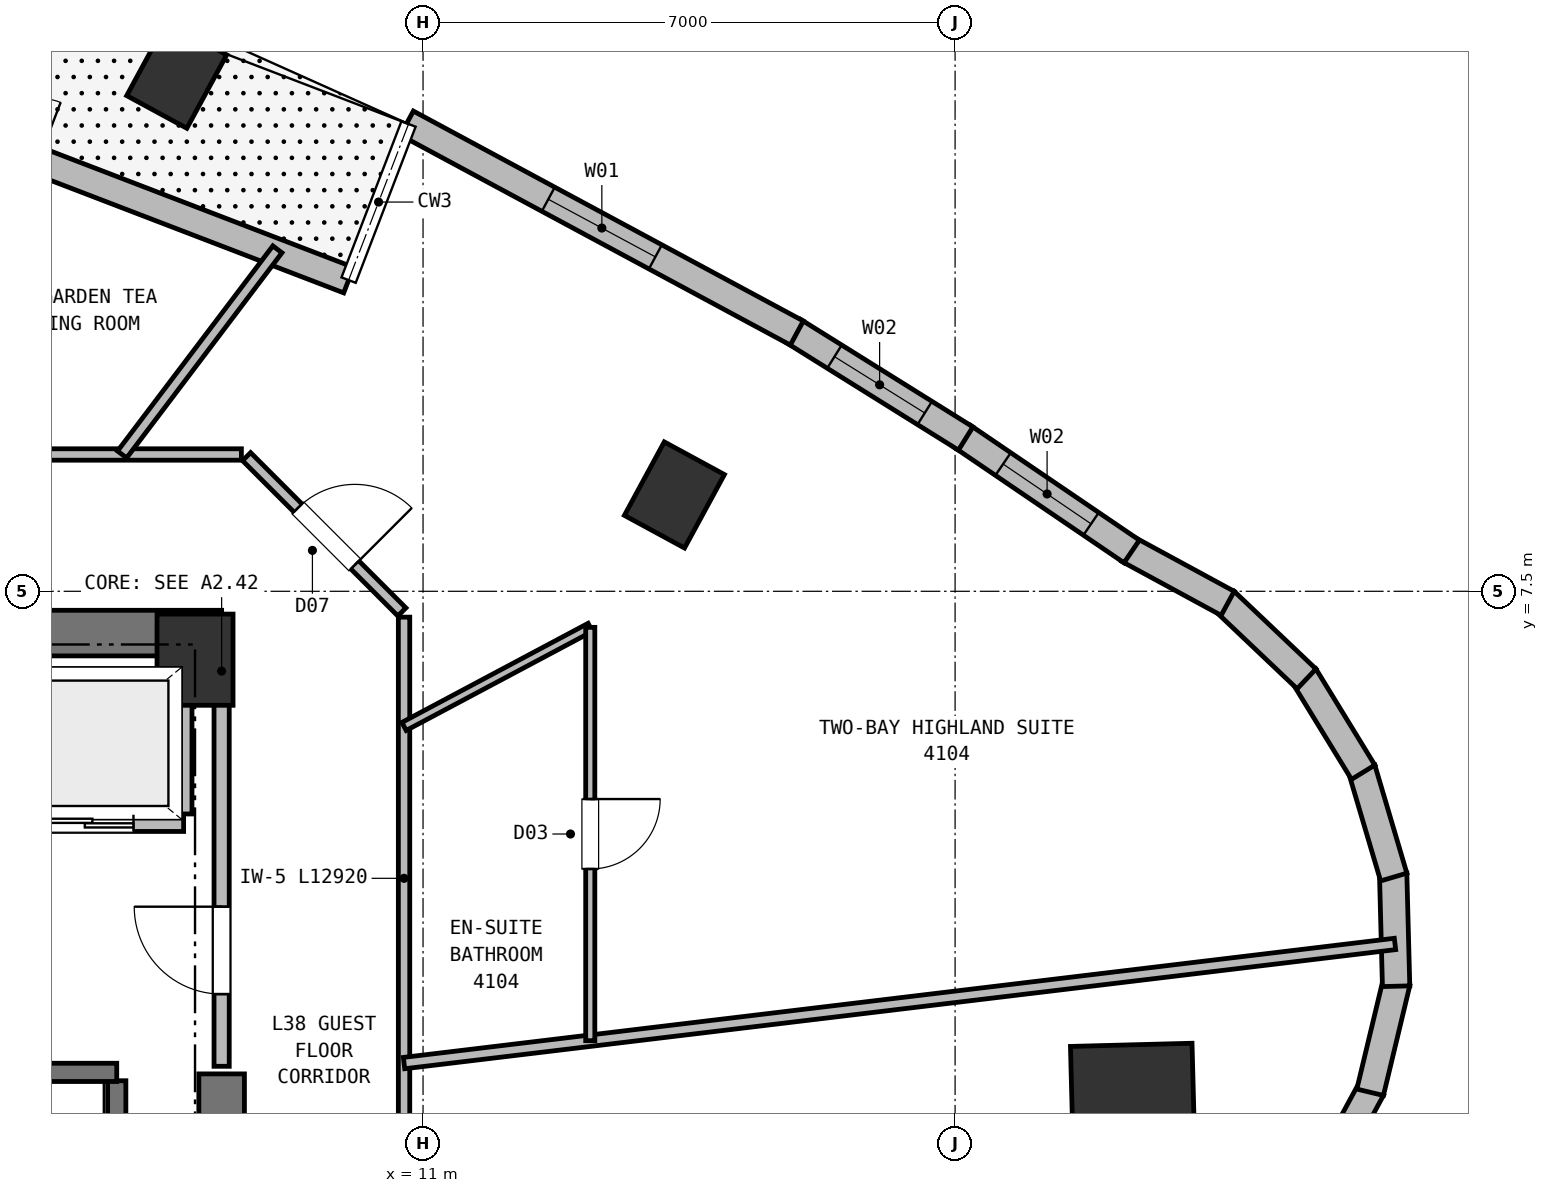
"""IFC4 building model, lengths in metres.
Left out: names, types, materials, properties, quantities, classifications, styles, units other than length and angle.
Written with IfcOpenShell. Run it as: python <this file> out.ifc"""

import sys

from ifc_helpers import new_model, si_unit, direction, frame, frame_2d, origin, origin_2d, place, context, subcontext, project, spatial, rectangle, extrude, element, fill, save


model = new_model("IFC4")
c1 = context("Model", 3, precision=1e-05, world=origin(), true_north=direction((0.0, 1.0)))
c2 = subcontext(c1, "Body", "Model", "MODEL_VIEW")
j1 = project(units=[si_unit("LENGTHUNIT", "METRE"), si_unit("PLANEANGLEUNIT", "RADIAN")], contexts=[c1])
p1 = place(None, origin())
s1 = spatial("IfcSite", under=j1, at=p1, CompositionType="ELEMENT")
p2 = place(p1, origin())
s2 = spatial("IfcBuilding", under=s1, at=p2, CompositionType="ELEMENT")
p3 = place(p2, frame((0.0, 0.0, 153.5)))
s3 = spatial("IfcBuildingStorey", under=s2, at=p3, CompositionType="ELEMENT", Elevation=153.5)
p4 = place(p3, frame((8.0, 6.6, 0.0), z_axis=(0.0, 0.0, 1.0), x_axis=(1.0, 0.0, 0.0)))
e1 = element("IfcColumn", 1, at=p4, inside=s3, PredefinedType="COLUMN", context=c2, shape_type="SweptSolid", body=[
    extrude(rectangle(XDim=1.0, YDim=1.2, at=origin_2d()), origin(), (0.0, 0.0, 1.0), 3.75),
])
p5 = place(p3, frame((-8.35, 6.95, 0.0), z_axis=(0.0, 0.0, 1.0), x_axis=(1.0, 0.0, 0.0)))
e2 = element("IfcWall", 2, at=p5, inside=s3, PredefinedType="SHEAR", context=c2, shape_type="SweptSolid", body=[
    extrude(rectangle(XDim=16.7, YDim=0.6, at=frame_2d((8.35, 0.0))), origin(), (0.0, 0.0, 1.0), 3.5),
])
p6 = place(p3, frame((8.35, -6.95, 0.0), z_axis=(0.0, 0.0, 1.0), x_axis=(0.0, 1.0, 0.0)))
e3 = element("IfcWall", 3, at=p6, inside=s3, PredefinedType="SHEAR", context=c2, shape_type="SweptSolid", body=[
    extrude(rectangle(XDim=8.1, YDim=0.6, at=frame_2d((4.05, 0.0))), origin(), (0.0, 0.0, 1.0), 3.5),
])
p7 = place(p3, frame((20.344, 0.533, 0.0), z_axis=(0.0, 0.0, 1.0), x_axis=(0.999657324976, 0.026176948308, 0.0)))
e4 = element("IfcColumn", 4, at=p7, inside=s3, PredefinedType="COLUMN", context=c2, shape_type="SweptSolid", body=[
    extrude(rectangle(XDim=1.6, YDim=2.0, at=origin_2d()), origin(), (0.0, 0.0, 1.0), 3.75),
])
for number, where, z_axis, x_axis in (
    (5, (14.307, 8.767, 0.0), (0.0, 0.0, 1.0), (-0.879, 0.477, 0.0)),
    (6, (7.759, 14.29, 0.0), (0.0, 0.0, 1.0), (-0.879, 0.477, 0.0)),
):
    element("IfcColumn", number, at=place(p3, frame(where, z_axis=z_axis, x_axis=x_axis)), inside=s3, PredefinedType="COLUMN", context=c2, shape_type="SweptSolid", body=[
        extrude(rectangle(XDim=0.9, YDim=1.1, at=origin_2d()), origin(), (0.0, 0.0, 1.0), 3.75),
    ])
p8 = place(p3, frame((0.312, 15.322, 0.0), z_axis=(0.0, 0.0, 1.0), x_axis=(0.933571699069, -0.358390684445, 0.0)))
e7 = element("IfcWall", 7, at=p8, inside=s3, PredefinedType="SOLIDWALL", context=c2, shape_type="SweptSolid", body=[
    extrude(rectangle(XDim=10.4, YDim=0.36, at=frame_2d((5.2, 0.0))), origin(), (0.0, 0.0, 1.0), 3.5),
])
p9 = place(p8, frame((4.375, 0.0, 0.0)))
e8 = element("IfcOpeningElement", 8, at=p9, cuts=e7, PredefinedType="OPENING", context=c2, shape_type="SweptSolid", body=[
    extrude(rectangle(XDim=1.65, YDim=2.25, at=frame_2d((0.825, 1.125))), frame((0.0, 0.19, 0.0), z_axis=(0.0, -1.0, 0.0), x_axis=(1.0, 0.0, 0.0)), (0.0, 0.0, 1.0), 0.38),
])
p10 = place(p3, frame((23.479, 0.955, 0.0), z_axis=(0.0, 0.0, 1.0), x_axis=(-0.477124494484, -0.878835716595, 0.0)))
e9 = element("IfcWall", 9, at=p10, inside=s3, PredefinedType="SOLIDWALL", context=c2, shape_type="SweptSolid", body=[
    extrude(rectangle(XDim=1.486, YDim=0.36, at=frame_2d((0.743, 0.0))), origin(), (0.0, 0.0, 1.0), 3.5),
])
for number, where, z_axis, x_axis in (
    (10, (23.808, 2.353, 0.0), (0.0, 0.0, 1.0), (-0.234, -0.972, 0.0)),
    (11, (23.763, 3.789, 0.0), (0.0, 0.0, 1.0), (0.026, -1.0, 0.0)),
):
    element("IfcWall", number, at=place(p3, frame(where, z_axis=z_axis, x_axis=x_axis)), inside=s3, PredefinedType="SOLIDWALL", context=c2, shape_type="SweptSolid", body=[
        extrude(rectangle(XDim=1.486, YDim=0.36, at=frame_2d((0.743, 0.0))), origin(), (0.0, 0.0, 1.0), 3.5),
    ])
for number, where, z_axis, x_axis in (
    (12, (23.349, 5.165, 0.0), (0.0, 0.0, 1.0), (0.284, -0.959, 0.0)),
    (13, (22.593, 6.386, 0.0), (0.0, 0.0, 1.0), (0.523, -0.853, 0.0)),
):
    element("IfcWall", number, at=place(p3, frame(where, z_axis=z_axis, x_axis=x_axis)), inside=s3, PredefinedType="SOLIDWALL", context=c2, shape_type="SweptSolid", body=[
        extrude(rectangle(XDim=1.486, YDim=0.36, at=frame_2d((0.743, 0.0))), origin(), (0.0, 0.0, 1.0), 3.5),
    ])
p11 = place(p3, frame((21.546, 7.37, 0.0), z_axis=(0.0, 0.0, 1.0), x_axis=(0.725348001868, -0.688382361908, 0.0)))
e14 = element("IfcWall", 14, at=p11, inside=s3, PredefinedType="SOLIDWALL", context=c2, shape_type="SweptSolid", body=[
    extrude(rectangle(XDim=1.486, YDim=0.36, at=frame_2d((0.743, 0.0))), origin(), (0.0, 0.0, 1.0), 3.5),
])
p12 = place(p3, frame((20.281, 8.05, 0.0), z_axis=(0.0, 0.0, 1.0), x_axis=(0.87890460574, -0.476997582812, 0.0)))
e15 = element("IfcWall", 15, at=p12, inside=s3, PredefinedType="SOLIDWALL", context=c2, shape_type="SweptSolid", body=[
    extrude(rectangle(XDim=1.486, YDim=0.36, at=frame_2d((0.743, 0.0))), origin(), (0.0, 0.0, 1.0), 3.5),
])
p13 = place(p3, frame((18.097, 9.537, 0.0), z_axis=(0.0, 0.0, 1.0), x_axis=(0.827020963394, -0.562171082596, 0.0)))
e16 = element("IfcWall", 16, at=p13, inside=s3, PredefinedType="SOLIDWALL", context=c2, shape_type="SweptSolid", body=[
    extrude(rectangle(XDim=2.692, YDim=0.36, at=frame_2d((1.346, 0.0))), origin(), (0.0, 0.0, 1.0), 3.5),
])
p14 = place(p13, frame((0.646, 0.0, 0.72)))
e17 = element("IfcOpeningElement", 17, at=p14, cuts=e16, PredefinedType="OPENING", context=c2, shape_type="SweptSolid", body=[
    extrude(rectangle(XDim=1.4, YDim=1.84, at=frame_2d((0.7, 0.92))), frame((0.0, 0.19, 0.0), z_axis=(0.0, -1.0, 0.0), x_axis=(1.0, 0.0, 0.0)), (0.0, 0.0, 1.0), 0.38),
])
p15 = place(p3, frame((15.875, 10.924, 0.0), z_axis=(0.0, 0.0, 1.0), x_axis=(0.848332062802, -0.529464551431, 0.0)))
e18 = element("IfcWall", 18, at=p15, inside=s3, PredefinedType="SOLIDWALL", context=c2, shape_type="SweptSolid", body=[
    extrude(rectangle(XDim=2.67, YDim=0.36, at=frame_2d((1.335, 0.0))), origin(), (0.0, 0.0, 1.0), 3.5),
])
p16 = place(p15, frame((0.635, 0.0, 0.72)))
e19 = element("IfcOpeningElement", 19, at=p16, cuts=e18, PredefinedType="OPENING", context=c2, shape_type="SweptSolid", body=[
    extrude(rectangle(XDim=1.4, YDim=1.84, at=frame_2d((0.7, 0.92))), frame((0.0, 0.19, 0.0), z_axis=(0.0, -1.0, 0.0), x_axis=(1.0, 0.0, 0.0)), (0.0, 0.0, 1.0), 0.38),
])
p17 = place(p3, frame((10.787, 13.66, 0.0), z_axis=(0.0, 0.0, 1.0), x_axis=(0.880519529696, -0.474009871019, 0.0)))
e20 = element("IfcWall", 20, at=p17, inside=s3, PredefinedType="SOLIDWALL", context=c2, shape_type="SweptSolid", body=[
    extrude(rectangle(XDim=5.827, YDim=0.36, at=frame_2d((2.914, 0.0))), origin(), (0.0, 0.0, 1.0), 3.5),
])
p18 = place(p17, frame((2.113, 0.0, 0.72)))
e21 = element("IfcOpeningElement", 21, at=p18, cuts=e20, PredefinedType="OPENING", context=c2, shape_type="SweptSolid", body=[
    extrude(rectangle(XDim=1.6, YDim=1.88, at=frame_2d((0.8, 0.94))), frame((0.0, 0.19, 0.0), z_axis=(0.0, -1.0, 0.0), x_axis=(1.0, 0.0, 0.0)), (0.0, 0.0, 1.0), 0.38),
])
p19 = place(p3, frame((6.97, -6.16, 0.0), z_axis=(0.0, 0.0, 1.0), x_axis=(0.0, 1.0, 0.0)))
e22 = element("IfcWall", 22, at=p19, inside=s3, PredefinedType="SHEAR", context=c2, shape_type="SweptSolid", body=[
    extrude(rectangle(XDim=7.22, YDim=0.24, at=frame_2d((3.61, 0.0))), origin(), (0.0, 0.0, 1.0), 3.5),
])
p20 = place(p3, frame((4.01, 1.17, 0.0), z_axis=(0.0, 0.0, 1.0), x_axis=(1.0, 0.0, 0.0)))
e23 = element("IfcWall", 23, at=p20, inside=s3, PredefinedType="SHEAR", context=c2, shape_type="SweptSolid", body=[
    extrude(rectangle(XDim=2.96, YDim=0.24, at=frame_2d((1.48, 0.0))), origin(), (0.0, 0.0, 1.0), 3.5),
])
p21 = place(p20, frame((0.9, 0.0, 0.0)))
e24 = element("IfcOpeningElement", 24, at=p21, cuts=e23, PredefinedType="OPENING", context=c2, shape_type="SweptSolid", body=[
    extrude(rectangle(XDim=1.15, YDim=2.15, at=frame_2d((0.575, 1.075))), frame((0.0, 0.13, 0.0), z_axis=(0.0, -1.0, 0.0), x_axis=(1.0, 0.0, 0.0)), (0.0, 0.0, 1.0), 0.26),
])
p22 = place(p3, frame((5.35, 4.45, 0.0), z_axis=(0.0, 0.0, 1.0), x_axis=(1.0, 0.0, 0.0)))
e25 = element("IfcWall", 25, at=p22, inside=s3, PredefinedType="PARTITIONING", context=c2, shape_type="SweptSolid", body=[
    extrude(rectangle(XDim=2.5, YDim=0.22, at=frame_2d((1.25, 0.0))), origin(), (0.0, 0.0, 1.0), 3.5),
])
p23 = place(p22, frame((0.66, 0.0, 0.0)))
e26 = element("IfcOpeningElement", 26, at=p23, cuts=e25, PredefinedType="OPENING", context=c2, shape_type="SweptSolid", body=[
    extrude(rectangle(XDim=1.18, YDim=2.15, at=frame_2d((0.59, 1.075))), frame((0.0, 0.12, 0.0), z_axis=(0.0, -1.0, 0.0), x_axis=(1.0, 0.0, 0.0)), (0.0, 0.0, 1.0), 0.24),
])
p24 = place(p3, frame((7.85, 4.57, 0.0), z_axis=(0.0, 0.0, 1.0), x_axis=(0.0, 1.0, 0.0)))
e27 = element("IfcWall", 27, at=p24, inside=s3, PredefinedType="PARTITIONING", context=c2, shape_type="SweptSolid", body=[
    extrude(rectangle(XDim=2.08, YDim=0.22, at=frame_2d((1.04, 0.0))), origin(), (0.0, 0.0, 1.0), 3.12),
])
p25 = place(p3, frame((8.35, 1.25, 0.0), z_axis=(0.0, 0.0, 1.0), x_axis=(0.0, 1.0, 0.0)))
e28 = element("IfcWall", 28, at=p25, inside=s3, PredefinedType="PARTITIONING", context=c2, shape_type="SweptSolid", body=[
    extrude(rectangle(XDim=5.3, YDim=0.2, at=frame_2d((2.65, 0.0))), origin(), (0.0, 0.0, 1.0), 3.5),
])
p26 = place(p25, frame((0.95, 0.0, 0.0)))
e29 = element("IfcOpeningElement", 29, at=p26, cuts=e28, PredefinedType="OPENING", context=c2, shape_type="SweptSolid", body=[
    extrude(rectangle(XDim=1.15, YDim=2.15, at=frame_2d((0.575, 1.075))), frame((0.0, 0.11, 0.0), z_axis=(0.0, -1.0, 0.0), x_axis=(1.0, 0.0, 0.0)), (0.0, 0.0, 1.0), 0.22),
])
p27 = place(p3, frame((10.75, 7.16, 0.0), z_axis=(0.0, 0.0, 1.0), x_axis=(0.0, -1.0, 0.0)))
e30 = element("IfcWall", 30, at=p27, inside=s3, PredefinedType="PARTITIONING", context=c2, shape_type="SweptSolid", body=[
    extrude(rectangle(XDim=12.92, YDim=0.15, at=frame_2d((6.46, 0.0))), origin(), (0.0, 0.0, 1.0), 3.5),
])
p28 = place(p27, frame((6.973, 0.0, 0.0)))
e31 = element("IfcOpeningElement", 31, at=p28, cuts=e30, PredefinedType="OPENING", context=c2, shape_type="SweptSolid", body=[
    extrude(rectangle(XDim=1.06, YDim=2.15, at=frame_2d((0.53, 1.075))), frame((0.0, 0.085, 0.0), z_axis=(0.0, -1.0, 0.0), x_axis=(1.0, 0.0, 0.0)), (0.0, 0.0, 1.0), 0.17),
])
p29 = place(p3, frame((8.678, 9.272, 0.0), z_axis=(0.0, 0.0, 1.0), x_axis=(0.707106781187, -0.707106781187, 0.0)))
e32 = element("IfcWall", 32, at=p29, inside=s3, PredefinedType="PARTITIONING", context=c2, shape_type="SweptSolid", body=[
    extrude(rectangle(XDim=2.89, YDim=0.15, at=frame_2d((1.445, 0.0))), origin(), (0.0, 0.0, 1.0), 3.5),
])
p30 = place(p29, frame((0.955, 0.0, 0.0)))
e33 = element("IfcOpeningElement", 33, at=p30, cuts=e32, PredefinedType="OPENING", context=c2, shape_type="SweptSolid", body=[
    extrude(rectangle(XDim=1.06, YDim=2.15, at=frame_2d((0.53, 1.075))), frame((0.0, 0.085, 0.0), z_axis=(0.0, -1.0, 0.0), x_axis=(1.0, 0.0, 0.0)), (0.0, 0.0, 1.0), 0.17),
])
p31 = place(p3, frame((-8.61, 9.3, 0.0), z_axis=(0.0, 0.0, 1.0), x_axis=(1.0, 0.0, 0.0)))
e34 = element("IfcWall", 34, at=p31, inside=s3, PredefinedType="PARTITIONING", context=c2, shape_type="SweptSolid", body=[
    extrude(rectangle(XDim=17.22, YDim=0.15, at=frame_2d((8.61, 0.0))), origin(), (0.0, 0.0, 1.0), 3.5),
])
p32 = place(p31, frame((12.527, 0.0, 0.0)))
e35 = element("IfcOpeningElement", 35, at=p32, cuts=e34, PredefinedType="OPENING", context=c2, shape_type="SweptSolid", body=[
    extrude(rectangle(XDim=1.0, YDim=2.15, at=frame_2d((0.5, 1.075))), frame((0.0, 0.085, 0.0), z_axis=(0.0, -1.0, 0.0), x_axis=(1.0, 0.0, 0.0)), (0.0, 0.0, 1.0), 0.17),
])
p33 = place(p31, frame((6.231, 0.0, 0.0)))
e36 = element("IfcOpeningElement", 36, at=p33, cuts=e34, PredefinedType="OPENING", context=c2, shape_type="SweptSolid", body=[
    extrude(rectangle(XDim=1.06, YDim=2.15, at=frame_2d((0.53, 1.075))), frame((0.0, 0.085, 0.0), z_axis=(0.0, -1.0, 0.0), x_axis=(1.0, 0.0, 0.0)), (0.0, 0.0, 1.0), 0.17),
])
p34 = place(p31, frame((0.14, 0.0, 0.0)))
e37 = element("IfcOpeningElement", 37, at=p34, cuts=e34, PredefinedType="OPENING", context=c2, shape_type="SweptSolid", body=[
    extrude(rectangle(XDim=1.06, YDim=2.15, at=frame_2d((0.53, 1.075))), frame((0.0, 0.085, 0.0), z_axis=(0.0, -1.0, 0.0), x_axis=(1.0, 0.0, 0.0)), (0.0, 0.0, 1.0), 0.17),
])
p35 = place(p3, frame((10.75, 1.292, 0.0), z_axis=(0.0, 0.0, 1.0), x_axis=(0.992851215359, 0.119358552939, 0.0)))
e38 = element("IfcWall", 38, at=p35, inside=s3, PredefinedType="PARTITIONING", context=c2, shape_type="SweptSolid", body=[
    extrude(rectangle(XDim=13.132, YDim=0.15, at=frame_2d((6.566, 0.0))), origin(), (0.0, 0.0, 1.0), 3.5),
])
p36 = place(p3, frame((13.2, 7.026, 0.0), z_axis=(0.0, 0.0, 1.0), x_axis=(-0.88275440909, -0.469834708416, 0.0)))
e39 = element("IfcWall", 39, at=p36, inside=s3, PredefinedType="PARTITIONING", context=c2, shape_type="SweptSolid", body=[
    extrude(rectangle(XDim=2.775, YDim=0.12, at=frame_2d((1.388, 0.0))), origin(), (0.0, 0.0, 1.0), 3.5),
])
p37 = place(p3, frame((13.2, 7.026, 0.0), z_axis=(0.0, 0.0, 1.0), x_axis=(0.0, -1.0, 0.0)))
e40 = element("IfcWall", 40, at=p37, inside=s3, PredefinedType="PARTITIONING", context=c2, shape_type="SweptSolid", body=[
    extrude(rectangle(XDim=5.439, YDim=0.12, at=frame_2d((2.719, 0.0))), origin(), (0.0, 0.0, 1.0), 3.5),
])
p38 = place(p37, frame((2.259, 0.0, 0.0)))
e41 = element("IfcOpeningElement", 41, at=p38, cuts=e40, PredefinedType="OPENING", context=c2, shape_type="SweptSolid", body=[
    extrude(rectangle(XDim=0.92, YDim=2.1, at=frame_2d((0.46, 1.05))), frame((0.0, 0.07, 0.0), z_axis=(0.0, -1.0, 0.0), x_axis=(1.0, 0.0, 0.0)), (0.0, 0.0, 1.0), 0.14),
])
p39 = place(p3, frame((7.04, 9.3, 0.0), z_axis=(0.0, 0.0, 1.0), x_axis=(0.603559151409, 0.797318224268, 0.0)))
e42 = element("IfcWall", 42, at=p39, inside=s3, PredefinedType="PARTITIONING", context=c2, shape_type="SweptSolid", body=[
    extrude(rectangle(XDim=3.386, YDim=0.15, at=frame_2d((1.693, 0.0))), origin(), (0.0, 0.0, 1.0), 3.5),
])
p40 = place(p14, origin())
e43 = element("IfcWindow", 43, at=p40, inside=s3, PartitioningType="SINGLE_PANEL", PredefinedType="WINDOW", context=c2, shape_type="SweptSolid", body=[
    extrude(rectangle(XDim=1.4, YDim=1.84, at=frame_2d((0.7, 0.92))), frame((0.0, 0.03, 0.0), z_axis=(0.0, -1.0, 0.0), x_axis=(1.0, 0.0, 0.0)), (0.0, 0.0, 1.0), 0.06),
])
fill(e17, e43)
p41 = place(p16, origin())
e44 = element("IfcWindow", 44, at=p41, inside=s3, PartitioningType="SINGLE_PANEL", PredefinedType="WINDOW", context=c2, shape_type="SweptSolid", body=[
    extrude(rectangle(XDim=1.4, YDim=1.84, at=frame_2d((0.7, 0.92))), frame((0.0, 0.03, 0.0), z_axis=(0.0, -1.0, 0.0), x_axis=(1.0, 0.0, 0.0)), (0.0, 0.0, 1.0), 0.06),
])
fill(e19, e44)
p42 = place(p18, origin())
e45 = element("IfcWindow", 45, at=p42, inside=s3, PartitioningType="SINGLE_PANEL", PredefinedType="WINDOW", context=c2, shape_type="SweptSolid", body=[
    extrude(rectangle(XDim=1.6, YDim=1.88, at=frame_2d((0.8, 0.94))), frame((0.0, 0.03, 0.0), z_axis=(0.0, -1.0, 0.0), x_axis=(1.0, 0.0, 0.0)), (0.0, 0.0, 1.0), 0.06),
])
fill(e21, e45)
p43 = place(p23, origin())
e46 = element("IfcDoor", 46, at=p43, inside=s3, OperationType="DOUBLE_DOOR_SLIDING", PredefinedType="DOOR", context=c2, shape_type="SweptSolid", body=[
    extrude(rectangle(XDim=1.18, YDim=2.15, at=frame_2d((0.59, 1.075))), frame((0.0, 0.025, 0.0), z_axis=(0.0, -1.0, 0.0), x_axis=(1.0, 0.0, 0.0)), (0.0, 0.0, 1.0), 0.05),
])
fill(e26, e46)
p44 = place(p26, origin())
e47 = element("IfcDoor", 47, at=p44, inside=s3, OperationType="SINGLE_SWING_RIGHT", PredefinedType="DOOR", context=c2, shape_type="SweptSolid", body=[
    extrude(rectangle(XDim=1.15, YDim=2.15, at=frame_2d((0.575, 1.075))), frame((0.0, 0.025, 0.0), z_axis=(0.0, -1.0, 0.0), x_axis=(1.0, 0.0, 0.0)), (0.0, 0.0, 1.0), 0.05),
])
fill(e29, e47)
p45 = place(p38, origin())
e48 = element("IfcDoor", 48, at=p45, inside=s3, OperationType="SINGLE_SWING_LEFT", PredefinedType="DOOR", context=c2, shape_type="SweptSolid", body=[
    extrude(rectangle(XDim=0.92, YDim=2.1, at=frame_2d((0.46, 1.05))), frame((0.0, 0.025, 0.0), z_axis=(0.0, -1.0, 0.0), x_axis=(1.0, 0.0, 0.0)), (0.0, 0.0, 1.0), 0.05),
])
fill(e41, e48)
p46 = place(p30, origin())
e49 = element("IfcDoor", 49, at=p46, inside=s3, OperationType="SINGLE_SWING_RIGHT", PredefinedType="DOOR", context=c2, shape_type="SweptSolid", body=[
    extrude(rectangle(XDim=1.06, YDim=2.15, at=frame_2d((0.53, 1.075))), frame((0.0, 0.025, 0.0), z_axis=(0.0, -1.0, 0.0), x_axis=(1.0, 0.0, 0.0)), (0.0, 0.0, 1.0), 0.05),
])
fill(e33, e49)
save(model, sys.argv[1])
